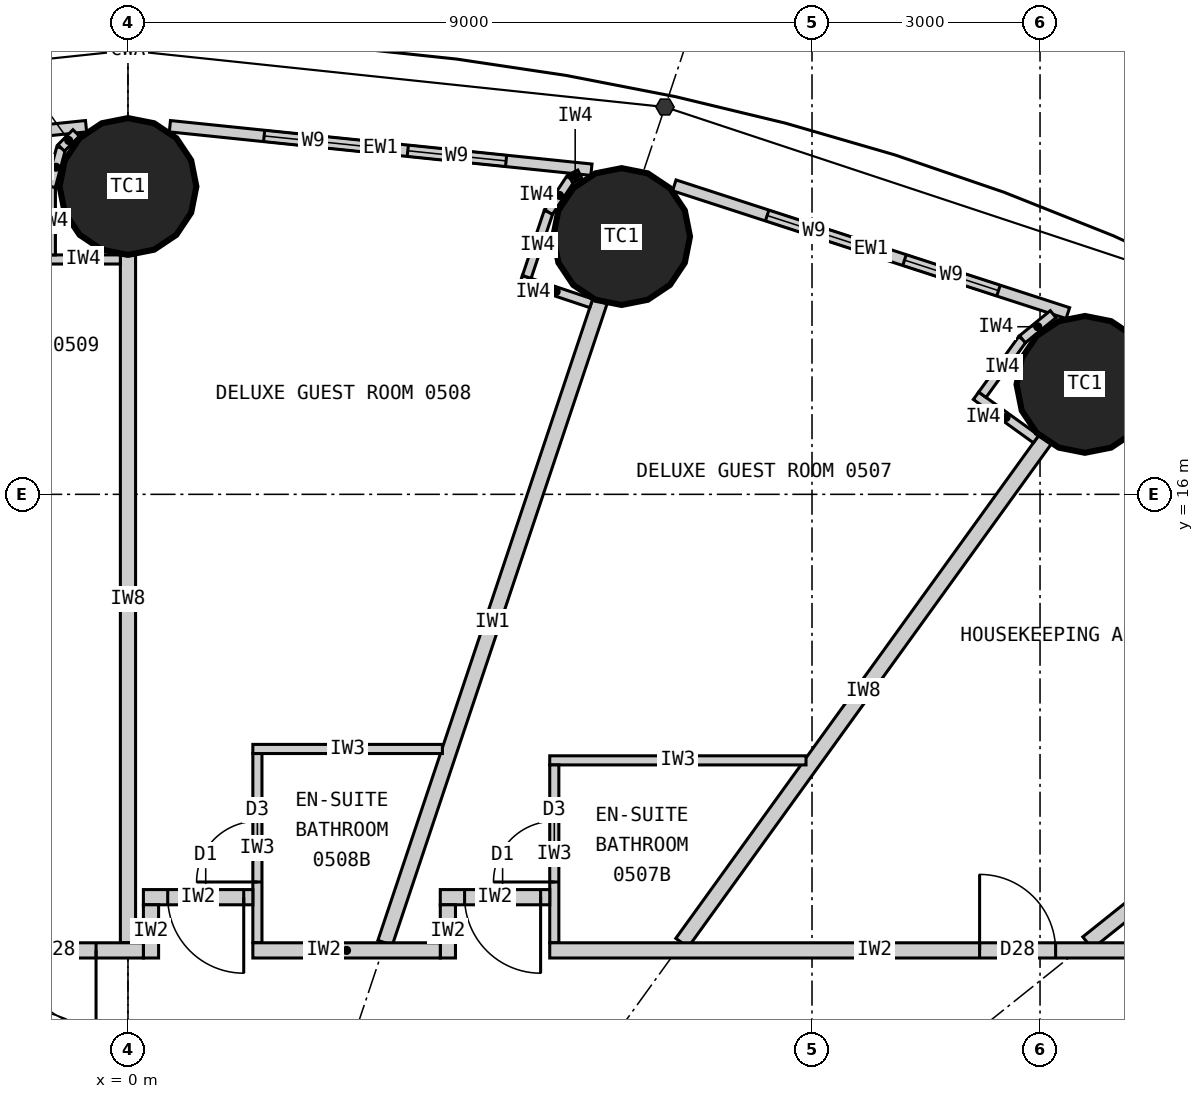
"""IFC4 building model, lengths in metres.
Left out: names, types, materials, properties, quantities, classifications, styles, units other than length and angle.
Written with IfcOpenShell. Run it as: python <this file> out.ifc"""

import sys

from ifc_helpers import new_model, si_unit, direction, frame, frame_2d, origin, origin_2d, place, context, subcontext, project, spatial, rectangle, circle, extrude, element, fill, save


model = new_model("IFC4")
c1 = context("Model", 3, precision=1e-05, world=origin(), true_north=direction((0.0, 1.0)))
c2 = subcontext(c1, "Body", "Model", "MODEL_VIEW")
j1 = project(units=[si_unit("LENGTHUNIT", "METRE"), si_unit("PLANEANGLEUNIT", "RADIAN")], contexts=[c1])
p1 = place(None, origin())
s1 = spatial("IfcSite", under=j1, at=p1, CompositionType="ELEMENT")
p2 = place(p1, origin())
s2 = spatial("IfcBuilding", under=s1, at=p2, CompositionType="ELEMENT")
p3 = place(p2, frame((0.0, 0.0, 29.4)))
s3 = spatial("IfcBuildingStorey", under=s2, at=p3, CompositionType="ELEMENT", Elevation=29.4)
for number, where, z_axis, x_axis in (
    (1, (12.591, 17.447, 0.0), (0.0, 0.0, 1.0), (1.0, 0.0, 0.0)),
    (2, (6.495, 19.391, 0.0), (0.0, 0.0, 1.0), (1.0, 0.0, 0.0)),
    (3, (0.0, 20.05, 0.0), (0.0, 0.0, 1.0), (1.0, 0.0, 0.0)),
):
    element("IfcColumn", number, at=place(p3, frame(where, z_axis=z_axis, x_axis=x_axis)), inside=s3, PredefinedType="COLUMN", context=c2, shape_type="SweptSolid", body=[
        extrude(circle(Radius=0.9, at=origin_2d()), origin(), (0.0, 0.0, 1.0), 3.3),
    ])
p4 = place(p3, frame((12.366, 18.384, 0.0), z_axis=(0.0, 0.0, 1.0), x_axis=(-0.951138486029, 0.308764603532, 0.0)))
e4 = element("IfcWall", 4, at=p4, inside=s3, PredefinedType="ELEMENTEDWALL", context=c2, shape_type="SweptSolid", body=[
    extrude(rectangle(XDim=5.444, YDim=0.15, at=frame_2d((2.722, 0.0))), origin(), (0.0, 0.0, 1.0), 3.12),
])
p5 = place(p4, frame((0.96, 0.0, 0.9)))
e5 = element("IfcOpeningElement", 5, at=p5, cuts=e4, PredefinedType="OPENING", context=c2, shape_type="SweptSolid", body=[
    extrude(rectangle(XDim=1.3, YDim=1.9, at=frame_2d((0.65, 0.95))), frame((0.0, 0.085, 0.0), z_axis=(0.0, -1.0, 0.0), x_axis=(1.0, 0.0, 0.0)), (0.0, 0.0, 1.0), 0.17),
])
p6 = place(p4, frame((2.86, 0.0, 0.9)))
e6 = element("IfcOpeningElement", 6, at=p6, cuts=e4, PredefinedType="OPENING", context=c2, shape_type="SweptSolid", body=[
    extrude(rectangle(XDim=1.3, YDim=1.9, at=frame_2d((0.65, 0.95))), frame((0.0, 0.085, 0.0), z_axis=(0.0, -1.0, 0.0), x_axis=(1.0, 0.0, 0.0)), (0.0, 0.0, 1.0), 0.17),
])
p7 = place(p3, frame((6.098, 20.271, 0.0), z_axis=(0.0, 0.0, 1.0), x_axis=(-0.994723735084, 0.102589915983, 0.0)))
e7 = element("IfcWall", 7, at=p7, inside=s3, PredefinedType="ELEMENTEDWALL", context=c2, shape_type="SweptSolid", body=[
    extrude(rectangle(XDim=5.576, YDim=0.15, at=frame_2d((2.788, 0.0))), origin(), (0.0, 0.0, 1.0), 3.12),
])
p8 = place(p7, frame((1.129, 0.0, 0.9)))
e8 = element("IfcOpeningElement", 8, at=p8, cuts=e7, PredefinedType="OPENING", context=c2, shape_type="SweptSolid", body=[
    extrude(rectangle(XDim=1.3, YDim=1.9, at=frame_2d((0.65, 0.95))), frame((0.0, 0.085, 0.0), z_axis=(0.0, -1.0, 0.0), x_axis=(1.0, 0.0, 0.0)), (0.0, 0.0, 1.0), 0.17),
])
p9 = place(p7, frame((3.029, 0.0, 0.9)))
e9 = element("IfcOpeningElement", 9, at=p9, cuts=e7, PredefinedType="OPENING", context=c2, shape_type="SweptSolid", body=[
    extrude(rectangle(XDim=1.3, YDim=1.9, at=frame_2d((0.65, 0.95))), frame((0.0, 0.085, 0.0), z_axis=(0.0, -1.0, 0.0), x_axis=(1.0, 0.0, 0.0)), (0.0, 0.0, 1.0), 0.17),
])
p10 = place(p3, frame((-0.551, 20.843, 0.0), z_axis=(0.0, 0.0, 1.0), x_axis=(-0.994723735084, -0.102589915983, 0.0)))
e10 = element("IfcWall", 10, at=p10, inside=s3, PredefinedType="ELEMENTEDWALL", context=c2, shape_type="SweptSolid", body=[
    extrude(rectangle(XDim=5.576, YDim=0.15, at=frame_2d((2.788, 0.0))), origin(), (0.0, 0.0, 1.0), 3.12),
])
p11 = place(p10, frame((1.247, 0.0, 0.9)))
e11 = element("IfcOpeningElement", 11, at=p11, cuts=e10, PredefinedType="OPENING", context=c2, shape_type="SweptSolid", body=[
    extrude(rectangle(XDim=1.3, YDim=1.9, at=frame_2d((0.65, 0.95))), frame((0.0, 0.085, 0.0), z_axis=(0.0, -1.0, 0.0), x_axis=(1.0, 0.0, 0.0)), (0.0, 0.0, 1.0), 0.17),
])
p12 = place(p10, frame((3.147, 0.0, 0.9)))
e12 = element("IfcOpeningElement", 12, at=p12, cuts=e10, PredefinedType="OPENING", context=c2, shape_type="SweptSolid", body=[
    extrude(rectangle(XDim=1.3, YDim=1.9, at=frame_2d((0.65, 0.95))), frame((0.0, 0.085, 0.0), z_axis=(0.0, -1.0, 0.0), x_axis=(1.0, 0.0, 0.0)), (0.0, 0.0, 1.0), 0.17),
])
p13 = place(p3, frame((12.625, 10.1, 0.0), z_axis=(0.0, 0.0, 1.0), x_axis=(0.780872884676, 0.624689953479, 0.0)))
e13 = element("IfcWall", 13, at=p13, inside=s3, PredefinedType="PARTITIONING", context=c2, shape_type="SweptSolid", body=[
    extrude(rectangle(XDim=5.845, YDim=0.2, at=frame_2d((2.922, 0.0))), origin(), (0.0, 0.0, 1.0), 2.32),
])
p14 = place(p3, frame((7.289, 10.1, 0.0), z_axis=(0.0, 0.0, 1.0), x_axis=(0.585216319319, 0.810877216108, 0.0)))
e14 = element("IfcWall", 14, at=p14, inside=s3, PredefinedType="PARTITIONING", context=c2, shape_type="SweptSolid", body=[
    extrude(rectangle(XDim=8.16, YDim=0.2, at=frame_2d((4.08, 0.0))), origin(), (0.0, 0.0, 1.0), 2.32),
])
p15 = place(p3, frame((3.383, 10.1, 0.0), z_axis=(0.0, 0.0, 1.0), x_axis=(0.317593727596, 0.948226884344, 0.0)))
e15 = element("IfcWall", 15, at=p15, inside=s3, PredefinedType="PARTITIONING", context=c2, shape_type="SweptSolid", body=[
    extrude(rectangle(XDim=8.899, YDim=0.2, at=frame_2d((4.449, 0.0))), origin(), (0.0, 0.0, 1.0), 2.32),
])
p16 = place(p3, frame((0.0, 10.1, 0.0), z_axis=(0.0, 0.0, 1.0), x_axis=(0.0, 1.0, 0.0)))
e16 = element("IfcWall", 16, at=p16, inside=s3, PredefinedType="PARTITIONING", context=c2, shape_type="SweptSolid", body=[
    extrude(rectangle(XDim=9.05, YDim=0.2, at=frame_2d((4.525, 0.0))), origin(), (0.0, 0.0, 1.0), 2.32),
])
p17 = place(p3, frame((8.921, 12.5, 0.0), z_axis=(0.0, 0.0, 1.0), x_axis=(-1.0, 0.0, 0.0)))
e17 = element("IfcWall", 17, at=p17, inside=s3, PredefinedType="PARTITIONING", context=c2, shape_type="SweptSolid", body=[
    extrude(rectangle(XDim=3.372, YDim=0.12, at=frame_2d((1.686, 0.0))), origin(), (0.0, 0.0, 1.0), 3.12),
])
p18 = place(p3, frame((5.609, 10.1, 0.0), z_axis=(0.0, 0.0, 1.0), x_axis=(0.0, 1.0, 0.0)))
e18 = element("IfcWall", 18, at=p18, inside=s3, PredefinedType="PARTITIONING", context=c2, shape_type="SweptSolid", body=[
    extrude(rectangle(XDim=2.34, YDim=0.12, at=frame_2d((1.17, 0.0))), origin(), (0.0, 0.0, 1.0), 3.12),
])
p19 = place(p18, frame((0.8, 0.0, 0.0)))
e19 = element("IfcOpeningElement", 19, at=p19, cuts=e18, PredefinedType="OPENING", context=c2, shape_type="SweptSolid", body=[
    extrude(rectangle(XDim=0.8, YDim=2.1, at=frame_2d((0.4, 1.05))), frame((0.0, 0.07, 0.0), z_axis=(0.0, -1.0, 0.0), x_axis=(1.0, 0.0, 0.0)), (0.0, 0.0, 1.0), 0.14),
])
p20 = place(p3, frame((4.137, 12.65, 0.0), z_axis=(0.0, 0.0, 1.0), x_axis=(-1.0, 0.0, 0.0)))
e20 = element("IfcWall", 20, at=p20, inside=s3, PredefinedType="PARTITIONING", context=c2, shape_type="SweptSolid", body=[
    extrude(rectangle(XDim=2.494, YDim=0.12, at=frame_2d((1.247, 0.0))), origin(), (0.0, 0.0, 1.0), 3.12),
])
p21 = place(p3, frame((1.703, 10.1, 0.0), z_axis=(0.0, 0.0, 1.0), x_axis=(0.0, 1.0, 0.0)))
e21 = element("IfcWall", 21, at=p21, inside=s3, PredefinedType="PARTITIONING", context=c2, shape_type="SweptSolid", body=[
    extrude(rectangle(XDim=2.49, YDim=0.12, at=frame_2d((1.245, 0.0))), origin(), (0.0, 0.0, 1.0), 3.12),
])
p22 = place(p21, frame((0.8, 0.0, 0.0)))
e22 = element("IfcOpeningElement", 22, at=p22, cuts=e21, PredefinedType="OPENING", context=c2, shape_type="SweptSolid", body=[
    extrude(rectangle(XDim=0.8, YDim=2.1, at=frame_2d((0.4, 1.05))), frame((0.0, 0.07, 0.0), z_axis=(0.0, -1.0, 0.0), x_axis=(1.0, 0.0, 0.0)), (0.0, 0.0, 1.0), 0.14),
])
p23 = place(p3, frame((4.109, 10.7, 0.0), z_axis=(0.0, 0.0, 1.0), x_axis=(1.0, 0.0, 0.0)))
e23 = element("IfcWall", 23, at=p23, inside=s3, PredefinedType="PARTITIONING", context=c2, shape_type="SweptSolid", body=[
    extrude(rectangle(XDim=1.44, YDim=0.2, at=frame_2d((0.72, 0.0))), origin(), (0.0, 0.0, 1.0), 3.12),
])
p24 = place(p23, frame((0.32, 0.0, 0.0)))
e24 = element("IfcOpeningElement", 24, at=p24, cuts=e23, PredefinedType="OPENING", context=c2, shape_type="SweptSolid", body=[
    extrude(rectangle(XDim=1.0, YDim=2.2, at=frame_2d((0.5, 1.1))), frame((0.0, 0.11, 0.0), z_axis=(0.0, -1.0, 0.0), x_axis=(1.0, 0.0, 0.0)), (0.0, 0.0, 1.0), 0.22),
])
p25 = place(p3, frame((4.209, 9.9, 0.0), z_axis=(0.0, 0.0, 1.0), x_axis=(0.0, 1.0, 0.0)))
e25 = element("IfcWall", 25, at=p25, inside=s3, PredefinedType="PARTITIONING", context=c2, shape_type="SweptSolid", body=[
    extrude(rectangle(XDim=0.7, YDim=0.2, at=frame_2d((0.35, 0.0))), origin(), (0.0, 0.0, 1.0), 3.12),
])
p26 = place(p3, frame((0.203, 10.7, 0.0), z_axis=(0.0, 0.0, 1.0), x_axis=(1.0, 0.0, 0.0)))
e26 = element("IfcWall", 26, at=p26, inside=s3, PredefinedType="PARTITIONING", context=c2, shape_type="SweptSolid", body=[
    extrude(rectangle(XDim=1.44, YDim=0.2, at=frame_2d((0.72, 0.0))), origin(), (0.0, 0.0, 1.0), 3.12),
])
p27 = place(p26, frame((0.32, 0.0, 0.0)))
e27 = element("IfcOpeningElement", 27, at=p27, cuts=e26, PredefinedType="OPENING", context=c2, shape_type="SweptSolid", body=[
    extrude(rectangle(XDim=1.0, YDim=2.2, at=frame_2d((0.5, 1.1))), frame((0.0, 0.11, 0.0), z_axis=(0.0, -1.0, 0.0), x_axis=(1.0, 0.0, 0.0)), (0.0, 0.0, 1.0), 0.22),
])
p28 = place(p3, frame((0.303, 9.9, 0.0), z_axis=(0.0, 0.0, 1.0), x_axis=(0.0, 1.0, 0.0)))
e28 = element("IfcWall", 28, at=p28, inside=s3, PredefinedType="PARTITIONING", context=c2, shape_type="SweptSolid", body=[
    extrude(rectangle(XDim=0.7, YDim=0.2, at=frame_2d((0.35, 0.0))), origin(), (0.0, 0.0, 1.0), 3.12),
])
p29 = place(p3, frame((-4.109, 10.0, 0.0), z_axis=(0.0, 0.0, 1.0), x_axis=(1.0, 0.0, 0.0)))
e29 = element("IfcWall", 29, at=p29, inside=s3, PredefinedType="PARTITIONING", context=c2, shape_type="SweptSolid", body=[
    extrude(rectangle(XDim=4.312, YDim=0.2, at=frame_2d((2.156, 0.0))), origin(), (0.0, 0.0, 1.0), 3.12),
])
p30 = place(p29, frame((2.689, 0.0, 0.0)))
e30 = element("IfcOpeningElement", 30, at=p30, cuts=e29, PredefinedType="OPENING", context=c2, shape_type="SweptSolid", body=[
    extrude(rectangle(XDim=1.0, YDim=2.2, at=frame_2d((0.5, 1.1))), frame((0.0, 0.11, 0.0), z_axis=(0.0, -1.0, 0.0), x_axis=(1.0, 0.0, 0.0)), (0.0, 0.0, 1.0), 0.22),
])
p31 = place(p3, frame((1.643, 10.0, 0.0), z_axis=(0.0, 0.0, 1.0), x_axis=(1.0, 0.0, 0.0)))
e31 = element("IfcWall", 31, at=p31, inside=s3, PredefinedType="PARTITIONING", context=c2, shape_type="SweptSolid", body=[
    extrude(rectangle(XDim=2.466, YDim=0.2, at=frame_2d((1.233, 0.0))), origin(), (0.0, 0.0, 1.0), 3.12),
])
p32 = place(p3, frame((5.549, 10.0, 0.0), z_axis=(0.0, 0.0, 1.0), x_axis=(1.0, 0.0, 0.0)))
e32 = element("IfcWall", 32, at=p32, inside=s3, PredefinedType="PARTITIONING", context=c2, shape_type="SweptSolid", body=[
    extrude(rectangle(XDim=8.551, YDim=0.2, at=frame_2d((4.275, 0.0))), origin(), (0.0, 0.0, 1.0), 3.12),
])
p33 = place(p32, frame((5.656, 0.0, 0.0)))
e33 = element("IfcOpeningElement", 33, at=p33, cuts=e32, PredefinedType="OPENING", context=c2, shape_type="SweptSolid", body=[
    extrude(rectangle(XDim=1.0, YDim=2.2, at=frame_2d((0.5, 1.1))), frame((0.0, 0.11, 0.0), z_axis=(0.0, -1.0, 0.0), x_axis=(1.0, 0.0, 0.0)), (0.0, 0.0, 1.0), 0.22),
])
p34 = place(p3, frame((11.948, 16.727, 0.0), z_axis=(0.0, 0.0, 1.0), x_axis=(-0.810897160646, 0.585188683123, 0.0)))
e34 = element("IfcWall", 34, at=p34, inside=s3, PredefinedType="PARTITIONING", context=c2, shape_type="SweptSolid", body=[
    extrude(rectangle(XDim=0.975, YDim=0.12, at=frame_2d((0.487, 0.0))), origin(), (0.0, 0.0, 1.0), 3.12),
])
p35 = place(p3, frame((11.241, 17.31, 0.0), z_axis=(0.0, 0.0, 1.0), x_axis=(0.585054732094, 0.810993810367, 0.0)))
e35 = element("IfcWall", 35, at=p35, inside=s3, PredefinedType="PARTITIONING", context=c2, shape_type="SweptSolid", body=[
    extrude(rectangle(XDim=0.9, YDim=0.12, at=frame_2d((0.45, 0.0))), origin(), (0.0, 0.0, 1.0), 3.12),
])
p36 = place(p3, frame((11.768, 18.04, 0.0), z_axis=(0.0, 0.0, 1.0), x_axis=(0.775268927517, 0.631631292787, 0.0)))
e36 = element("IfcWall", 36, at=p36, inside=s3, PredefinedType="PARTITIONING", context=c2, shape_type="SweptSolid", body=[
    extrude(rectangle(XDim=0.522, YDim=0.12, at=frame_2d((0.261, 0.0))), origin(), (0.0, 0.0, 1.0), 3.12),
])
p37 = place(p3, frame((6.095, 18.513, 0.0), z_axis=(0.0, 0.0, 1.0), x_axis=(-0.948281677008, 0.317430088446, 0.0)))
e37 = element("IfcWall", 37, at=p37, inside=s3, PredefinedType="PARTITIONING", context=c2, shape_type="SweptSolid", body=[
    extrude(rectangle(XDim=0.974, YDim=0.12, at=frame_2d((0.487, 0.0))), origin(), (0.0, 0.0, 1.0), 3.12),
])
p38 = place(p3, frame((5.247, 18.86, 0.0), z_axis=(0.0, 0.0, 1.0), x_axis=(0.317610704489, 0.94822119803, 0.0)))
e38 = element("IfcWall", 38, at=p38, inside=s3, PredefinedType="PARTITIONING", context=c2, shape_type="SweptSolid", body=[
    extrude(rectangle(XDim=0.9, YDim=0.12, at=frame_2d((0.45, 0.0))), origin(), (0.0, 0.0, 1.0), 3.12),
])
p39 = place(p3, frame((5.533, 19.714, 0.0), z_axis=(0.0, 0.0, 1.0), x_axis=(0.552014331743, 0.833834622422, 0.0)))
e39 = element("IfcWall", 39, at=p39, inside=s3, PredefinedType="PARTITIONING", context=c2, shape_type="SweptSolid", body=[
    extrude(rectangle(XDim=0.525, YDim=0.12, at=frame_2d((0.262, 0.0))), origin(), (0.0, 0.0, 1.0), 3.12),
])
p40 = place(p3, frame((5.823, 20.151, 0.0), z_axis=(0.0, 0.0, 1.0), x_axis=(0.894784104941, 0.446499054362, 0.0)))
e40 = element("IfcWall", 40, at=p40, inside=s3, PredefinedType="PARTITIONING", context=c2, shape_type="SweptSolid", body=[
    extrude(rectangle(XDim=0.137, YDim=0.12, at=frame_2d((0.068, 0.0))), origin(), (0.0, 0.0, 1.0), 3.12),
])
p41 = place(p3, frame((-0.1, 19.09, 0.0), z_axis=(0.0, 0.0, 1.0), x_axis=(-1.0, 0.0, 0.0)))
e41 = element("IfcWall", 41, at=p41, inside=s3, PredefinedType="PARTITIONING", context=c2, shape_type="SweptSolid", body=[
    extrude(rectangle(XDim=0.974, YDim=0.12, at=frame_2d((0.487, 0.0))), origin(), (0.0, 0.0, 1.0), 3.12),
])
p42 = place(p3, frame((-1.015, 19.15, 0.0), z_axis=(0.0, 0.0, 1.0), x_axis=(0.0, 1.0, 0.0)))
e42 = element("IfcWall", 42, at=p42, inside=s3, PredefinedType="PARTITIONING", context=c2, shape_type="SweptSolid", body=[
    extrude(rectangle(XDim=0.9, YDim=0.12, at=frame_2d((0.45, 0.0))), origin(), (0.0, 0.0, 1.0), 3.12),
])
p43 = place(p3, frame((-1.015, 20.05, 0.0), z_axis=(0.0, 0.0, 1.0), x_axis=(0.258906465625, 0.96590239779, 0.0)))
e43 = element("IfcWall", 43, at=p43, inside=s3, PredefinedType="PARTITIONING", context=c2, shape_type="SweptSolid", body=[
    extrude(rectangle(XDim=0.525, YDim=0.12, at=frame_2d((0.263, 0.0))), origin(), (0.0, 0.0, 1.0), 3.12),
])
p44 = place(p3, frame((-0.879, 20.557, 0.0), z_axis=(0.0, 0.0, 1.0), x_axis=(0.707106781187, 0.707106781187, 0.0)))
e44 = element("IfcWall", 44, at=p44, inside=s3, PredefinedType="PARTITIONING", context=c2, shape_type="SweptSolid", body=[
    extrude(rectangle(XDim=0.279, YDim=0.12, at=frame_2d((0.14, 0.0))), origin(), (0.0, 0.0, 1.0), 3.12),
])
p45 = place(p5, origin())
e45 = element("IfcWindow", 45, at=p45, inside=s3, PartitioningType="SINGLE_PANEL", PredefinedType="WINDOW", context=c2, shape_type="SweptSolid", body=[
    extrude(rectangle(XDim=1.3, YDim=1.9, at=frame_2d((0.65, 0.95))), frame((0.0, 0.03, 0.0), z_axis=(0.0, -1.0, 0.0), x_axis=(1.0, 0.0, 0.0)), (0.0, 0.0, 1.0), 0.06),
])
fill(e5, e45)
p46 = place(p6, origin())
e46 = element("IfcWindow", 46, at=p46, inside=s3, PartitioningType="SINGLE_PANEL", PredefinedType="WINDOW", context=c2, shape_type="SweptSolid", body=[
    extrude(rectangle(XDim=1.3, YDim=1.9, at=frame_2d((0.65, 0.95))), frame((0.0, 0.03, 0.0), z_axis=(0.0, -1.0, 0.0), x_axis=(1.0, 0.0, 0.0)), (0.0, 0.0, 1.0), 0.06),
])
fill(e6, e46)
p47 = place(p8, origin())
e47 = element("IfcWindow", 47, at=p47, inside=s3, PartitioningType="SINGLE_PANEL", PredefinedType="WINDOW", context=c2, shape_type="SweptSolid", body=[
    extrude(rectangle(XDim=1.3, YDim=1.9, at=frame_2d((0.65, 0.95))), frame((0.0, 0.03, 0.0), z_axis=(0.0, -1.0, 0.0), x_axis=(1.0, 0.0, 0.0)), (0.0, 0.0, 1.0), 0.06),
])
fill(e8, e47)
p48 = place(p9, origin())
e48 = element("IfcWindow", 48, at=p48, inside=s3, PartitioningType="SINGLE_PANEL", PredefinedType="WINDOW", context=c2, shape_type="SweptSolid", body=[
    extrude(rectangle(XDim=1.3, YDim=1.9, at=frame_2d((0.65, 0.95))), frame((0.0, 0.03, 0.0), z_axis=(0.0, -1.0, 0.0), x_axis=(1.0, 0.0, 0.0)), (0.0, 0.0, 1.0), 0.06),
])
fill(e9, e48)
p49 = place(p33, origin())
e49 = element("IfcDoor", 49, at=p49, inside=s3, OperationType="SINGLE_SWING_LEFT", PredefinedType="DOOR", context=c2, shape_type="SweptSolid", body=[
    extrude(rectangle(XDim=1.0, YDim=2.2, at=frame_2d((0.5, 1.1))), frame((0.0, 0.025, 0.0), z_axis=(0.0, -1.0, 0.0), x_axis=(1.0, 0.0, 0.0)), (0.0, 0.0, 1.0), 0.05),
])
fill(e33, e49)
p50 = place(p19, origin())
e50 = element("IfcDoor", 50, at=p50, inside=s3, OperationType="SINGLE_SWING_LEFT", PredefinedType="DOOR", context=c2, shape_type="SweptSolid", body=[
    extrude(rectangle(XDim=0.8, YDim=2.1, at=frame_2d((0.4, 1.05))), frame((0.0, 0.025, 0.0), z_axis=(0.0, -1.0, 0.0), x_axis=(1.0, 0.0, 0.0)), (0.0, 0.0, 1.0), 0.05),
])
fill(e19, e50)
p51 = place(p24, origin())
e51 = element("IfcDoor", 51, at=p51, inside=s3, OperationType="SINGLE_SWING_RIGHT", PredefinedType="DOOR", context=c2, shape_type="SweptSolid", body=[
    extrude(rectangle(XDim=1.0, YDim=2.2, at=frame_2d((0.5, 1.1))), frame((0.0, 0.025, 0.0), z_axis=(0.0, -1.0, 0.0), x_axis=(1.0, 0.0, 0.0)), (0.0, 0.0, 1.0), 0.05),
])
fill(e24, e51)
p52 = place(p22, origin())
e52 = element("IfcDoor", 52, at=p52, inside=s3, OperationType="SINGLE_SWING_LEFT", PredefinedType="DOOR", context=c2, shape_type="SweptSolid", body=[
    extrude(rectangle(XDim=0.8, YDim=2.1, at=frame_2d((0.4, 1.05))), frame((0.0, 0.025, 0.0), z_axis=(0.0, -1.0, 0.0), x_axis=(1.0, 0.0, 0.0)), (0.0, 0.0, 1.0), 0.05),
])
fill(e22, e52)
p53 = place(p27, origin())
e53 = element("IfcDoor", 53, at=p53, inside=s3, OperationType="SINGLE_SWING_RIGHT", PredefinedType="DOOR", context=c2, shape_type="SweptSolid", body=[
    extrude(rectangle(XDim=1.0, YDim=2.2, at=frame_2d((0.5, 1.1))), frame((0.0, 0.025, 0.0), z_axis=(0.0, -1.0, 0.0), x_axis=(1.0, 0.0, 0.0)), (0.0, 0.0, 1.0), 0.05),
])
fill(e27, e53)
p54 = place(p30, origin())
e54 = element("IfcDoor", 54, at=p54, inside=s3, OperationType="SINGLE_SWING_RIGHT", PredefinedType="DOOR", context=c2, shape_type="SweptSolid", body=[
    extrude(rectangle(XDim=1.0, YDim=2.2, at=frame_2d((0.5, 1.1))), frame((0.0, 0.025, 0.0), z_axis=(0.0, -1.0, 0.0), x_axis=(1.0, 0.0, 0.0)), (0.0, 0.0, 1.0), 0.05),
])
fill(e30, e54)
save(model, sys.argv[1])
